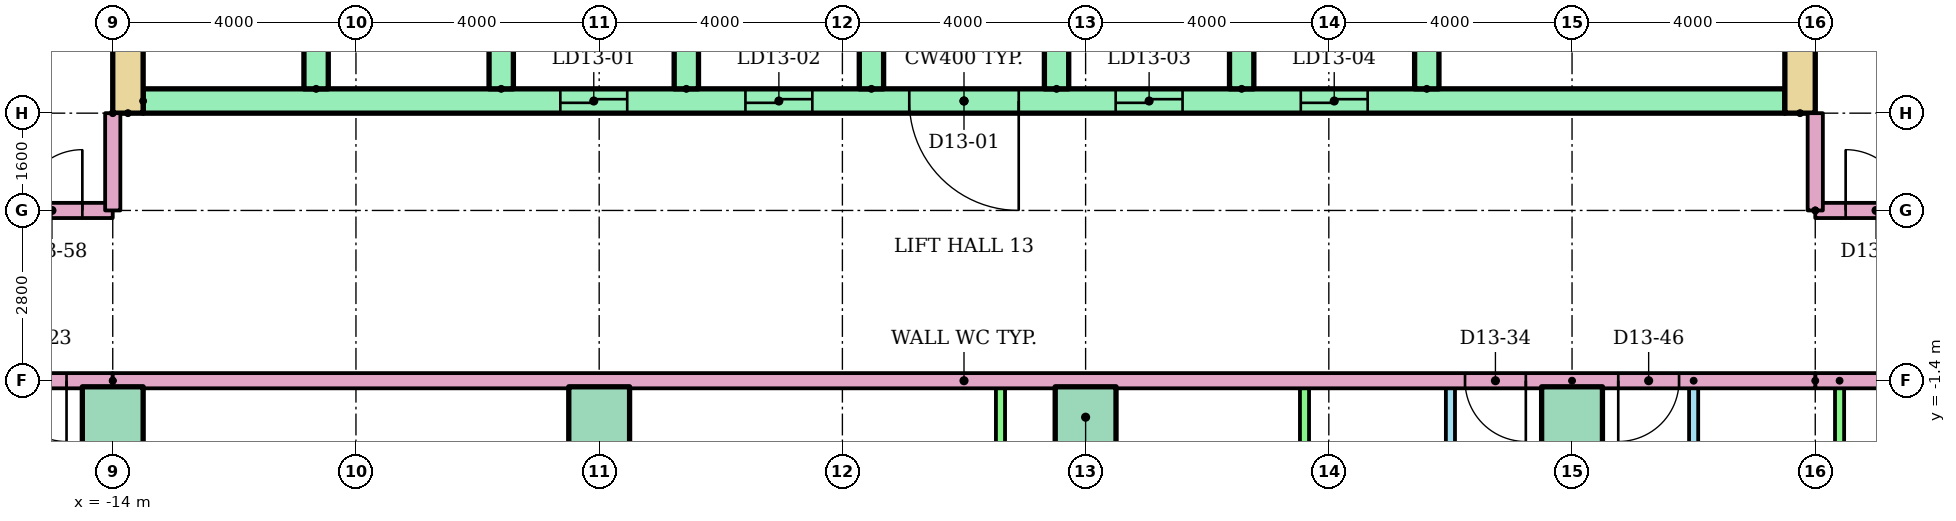
"""IFC4 building model, lengths in metres.
Left out: names, types, materials, properties, quantities, classifications, styles, units other than length and angle.
Written with IfcOpenShell. Run it as: python <this file> out.ifc"""

import sys

from ifc_helpers import new_model, si_unit, direction, frame, frame_2d, origin, origin_2d, place, context, subcontext, project, spatial, rectangle, extrude, element, fill, save


model = new_model("IFC4")
c1 = context("Model", 3, precision=1e-05, world=origin(), true_north=direction((0.0, 1.0)))
c2 = subcontext(c1, "Body", "Model", "MODEL_VIEW")
j1 = project(units=[si_unit("LENGTHUNIT", "METRE"), si_unit("PLANEANGLEUNIT", "RADIAN")], contexts=[c1])
p1 = place(None, origin())
s1 = spatial("IfcSite", under=j1, at=p1, CompositionType="ELEMENT")
p2 = place(p1, origin())
s2 = spatial("IfcBuilding", under=s1, at=p2, CompositionType="ELEMENT")
p3 = place(p2, frame((0.0, 0.0, 51.2)))
s3 = spatial("IfcBuildingStorey", under=s2, at=p3, CompositionType="ELEMENT", Elevation=51.2)
for number, where in (
    (1, (-14.0, -2.0, 0.0)),
    (2, (-6.0, -2.0, 0.0)),
    (3, (2.0, -2.0, 0.0)),
    (4, (10.0, -2.0, 0.0)),
):
    element("IfcColumn", number, at=place(p3, frame(where)), inside=s3, PredefinedType="COLUMN", context=c2, shape_type="SweptSolid", body=[
        extrude(rectangle(XDim=1.0, YDim=1.0, at=origin_2d()), origin(), (0.0, 0.0, 1.0), 3.2),
    ])
for number, where, z_axis, x_axis in (
    (5, (-13.75, 3.0, 0.0), (0.0, 0.0, 1.0), (0.0, 1.0, 0.0)),
    (6, (13.75, 3.0, 0.0), (0.0, 0.0, 1.0), (0.0, 1.0, 0.0)),
):
    element("IfcWall", number, at=place(p3, frame(where, z_axis=z_axis, x_axis=x_axis)), inside=s3, PredefinedType="SHEAR", context=c2, shape_type="SweptSolid", body=[
        extrude(rectangle(XDim=17.0, YDim=0.5, at=frame_2d((8.5, 0.0))), origin(), (0.0, 0.0, 1.0), 2.92),
    ])
p4 = place(p3, frame((-13.5, 3.2, 0.0)))
e7 = element("IfcWall", 7, at=p4, inside=s3, PredefinedType="SHEAR", context=c2, shape_type="SweptSolid", body=[
    extrude(rectangle(XDim=27.0, YDim=0.4, at=frame_2d((13.5, 0.0))), origin(), (0.0, 0.0, 1.0), 2.92),
])
p5 = place(p4, frame((6.861, 0.0, 0.0)))
e8 = element("IfcOpeningElement", 8, at=p5, cuts=e7, PredefinedType="OPENING", context=c2, shape_type="SweptSolid", body=[
    extrude(rectangle(XDim=1.1, YDim=2.1, at=frame_2d((0.55, 1.05))), frame((0.0, 0.21, 0.0), z_axis=(0.0, -1.0, 0.0), x_axis=(1.0, 0.0, 0.0)), (0.0, 0.0, 1.0), 0.42),
])
p6 = place(p4, frame((9.906, 0.0, 0.0)))
e9 = element("IfcOpeningElement", 9, at=p6, cuts=e7, PredefinedType="OPENING", context=c2, shape_type="SweptSolid", body=[
    extrude(rectangle(XDim=1.1, YDim=2.1, at=frame_2d((0.55, 1.05))), frame((0.0, 0.21, 0.0), z_axis=(0.0, -1.0, 0.0), x_axis=(1.0, 0.0, 0.0)), (0.0, 0.0, 1.0), 0.42),
])
p7 = place(p4, frame((15.994, 0.0, 0.0)))
e10 = element("IfcOpeningElement", 10, at=p7, cuts=e7, PredefinedType="OPENING", context=c2, shape_type="SweptSolid", body=[
    extrude(rectangle(XDim=1.1, YDim=2.1, at=frame_2d((0.55, 1.05))), frame((0.0, 0.21, 0.0), z_axis=(0.0, -1.0, 0.0), x_axis=(1.0, 0.0, 0.0)), (0.0, 0.0, 1.0), 0.42),
])
p8 = place(p4, frame((19.039, 0.0, 0.0)))
e11 = element("IfcOpeningElement", 11, at=p8, cuts=e7, PredefinedType="OPENING", context=c2, shape_type="SweptSolid", body=[
    extrude(rectangle(XDim=1.1, YDim=2.1, at=frame_2d((0.55, 1.05))), frame((0.0, 0.21, 0.0), z_axis=(0.0, -1.0, 0.0), x_axis=(1.0, 0.0, 0.0)), (0.0, 0.0, 1.0), 0.42),
])
p9 = place(p4, frame((12.6, 0.0, 0.0)))
e12 = element("IfcOpeningElement", 12, at=p9, cuts=e7, PredefinedType="OPENING", context=c2, shape_type="SweptSolid", body=[
    extrude(rectangle(XDim=1.8, YDim=2.1, at=frame_2d((0.9, 1.05))), frame((0.0, 0.21, 0.0), z_axis=(0.0, -1.0, 0.0), x_axis=(1.0, 0.0, 0.0)), (0.0, 0.0, 1.0), 0.42),
])
for number, where, z_axis, x_axis in (
    (13, (-10.656, 3.4, 0.0), (0.0, 0.0, 1.0), (0.0, 1.0, 0.0)),
    (14, (-7.611, 3.4, 0.0), (0.0, 0.0, 1.0), (0.0, 1.0, 0.0)),
    (15, (-4.567, 3.4, 0.0), (0.0, 0.0, 1.0), (0.0, 1.0, 0.0)),
    (16, (-1.522, 3.4, 0.0), (0.0, 0.0, 1.0), (0.0, 1.0, 0.0)),
    (17, (1.522, 3.4, 0.0), (0.0, 0.0, 1.0), (0.0, 1.0, 0.0)),
    (18, (4.567, 3.4, 0.0), (0.0, 0.0, 1.0), (0.0, 1.0, 0.0)),
    (19, (7.611, 3.4, 0.0), (0.0, 0.0, 1.0), (0.0, 1.0, 0.0)),
):
    element("IfcWall", number, at=place(p3, frame(where, z_axis=z_axis, x_axis=x_axis)), inside=s3, PredefinedType="SHEAR", context=c2, shape_type="SweptSolid", body=[
        extrude(rectangle(XDim=3.0, YDim=0.4, at=frame_2d((1.5, 0.0))), origin(), (0.0, 0.0, 1.0), 2.92),
    ])
p10 = place(p3, frame((8.0, -9.0, 0.0), z_axis=(0.0, 0.0, 1.0), x_axis=(0.0, 1.0, 0.0)))
e20 = element("IfcWall", 20, at=p10, inside=s3, PredefinedType="PARTITIONING", context=c2, shape_type="SweptSolid", body=[
    extrude(rectangle(XDim=7.6, YDim=0.15, at=frame_2d((3.8, 0.0))), origin(), (0.0, 0.0, 1.0), 2.4),
])
p11 = place(p10, frame((5.025, 0.0, 0.0)))
e21 = element("IfcOpeningElement", 21, at=p11, cuts=e20, PredefinedType="OPENING", context=c2, shape_type="SweptSolid", body=[
    extrude(rectangle(XDim=0.9, YDim=2.1, at=frame_2d((0.45, 1.05))), frame((0.0, 0.085, 0.0), z_axis=(0.0, -1.0, 0.0), x_axis=(1.0, 0.0, 0.0)), (0.0, 0.0, 1.0), 0.17),
])
p12 = place(p10, frame((1.275, 0.0, 0.0)))
e22 = element("IfcOpeningElement", 22, at=p12, cuts=e20, PredefinedType="OPENING", context=c2, shape_type="SweptSolid", body=[
    extrude(rectangle(XDim=0.8, YDim=2.1, at=frame_2d((0.4, 1.05))), frame((0.0, 0.085, 0.0), z_axis=(0.0, -1.0, 0.0), x_axis=(1.0, 0.0, 0.0)), (0.0, 0.0, 1.0), 0.17),
])
for number, where, z_axis, x_axis in (
    (23, (5.6, -9.0, 0.0), (0.0, 0.0, 1.0), (0.0, 1.0, 0.0)),
    (24, (0.6, -9.0, 0.0), (0.0, 0.0, 1.0), (0.0, 1.0, 0.0)),
    (25, (-5.9, -9.0, 0.0), (0.0, 0.0, 1.0), (0.0, 1.0, 0.0)),
):
    element("IfcWall", number, at=place(p3, frame(where, z_axis=z_axis, x_axis=x_axis)), inside=s3, PredefinedType="PARTITIONING", context=c2, shape_type="SweptSolid", body=[
        extrude(rectangle(XDim=7.6, YDim=0.15, at=frame_2d((3.8, 0.0))), origin(), (0.0, 0.0, 1.0), 2.4),
    ])
p13 = place(p3, frame((-14.0, -1.4, 0.0), z_axis=(0.0, 0.0, 1.0), x_axis=(0.0, -1.0, 0.0)))
e26 = element("IfcWall", 26, at=p13, inside=s3, PredefinedType="PARTITIONING", context=c2, shape_type="SweptSolid", body=[
    extrude(rectangle(XDim=14.71, YDim=0.25, at=frame_2d((7.355, 0.0))), origin(), (0.0, 0.0, 1.0), 2.4),
])
p14 = place(p3, frame((12.0, -1.4, 0.0), z_axis=(0.0, 0.0, 1.0), x_axis=(0.0, -1.0, 0.0)))
e27 = element("IfcWall", 27, at=p14, inside=s3, PredefinedType="PARTITIONING", context=c2, shape_type="SweptSolid", body=[
    extrude(rectangle(XDim=7.6, YDim=0.15, at=frame_2d((3.8, 0.0))), origin(), (0.0, 0.0, 1.0), 2.4),
])
p15 = place(p14, frame((1.675, 0.0, 0.0)))
e28 = element("IfcOpeningElement", 28, at=p15, cuts=e27, PredefinedType="OPENING", context=c2, shape_type="SweptSolid", body=[
    extrude(rectangle(XDim=0.9, YDim=2.1, at=frame_2d((0.45, 1.05))), frame((0.0, 0.085, 0.0), z_axis=(0.0, -1.0, 0.0), x_axis=(1.0, 0.0, 0.0)), (0.0, 0.0, 1.0), 0.17),
])
p16 = place(p14, frame((5.525, 0.0, 0.0)))
e29 = element("IfcOpeningElement", 29, at=p16, cuts=e27, PredefinedType="OPENING", context=c2, shape_type="SweptSolid", body=[
    extrude(rectangle(XDim=0.8, YDim=2.1, at=frame_2d((0.4, 1.05))), frame((0.0, 0.085, 0.0), z_axis=(0.0, -1.0, 0.0), x_axis=(1.0, 0.0, 0.0)), (0.0, 0.0, 1.0), 0.17),
])
p17 = place(p3, frame((14.4, -1.4, 0.0), z_axis=(0.0, 0.0, 1.0), x_axis=(0.0, -1.0, 0.0)))
e30 = element("IfcWall", 30, at=p17, inside=s3, PredefinedType="PARTITIONING", context=c2, shape_type="SweptSolid", body=[
    extrude(rectangle(XDim=7.6, YDim=0.15, at=frame_2d((3.8, 0.0))), origin(), (0.0, 0.0, 1.0), 2.4),
])
p18 = place(p3, frame((10.0, -1.4, 0.0), z_axis=(0.0, 0.0, 1.0), x_axis=(0.0, -1.0, 0.0)))
e31 = element("IfcWall", 31, at=p18, inside=s3, PredefinedType="PARTITIONING", context=c2, shape_type="SweptSolid", body=[
    extrude(rectangle(XDim=14.71, YDim=0.25, at=frame_2d((7.355, 0.0))), origin(), (0.0, 0.0, 1.0), 2.4),
])
p19 = place(p3, frame((-14.0, -1.4, 0.0), z_axis=(0.0, 0.0, 1.0), x_axis=(-1.0, 0.0, 0.0)))
e32 = element("IfcWall", 32, at=p19, inside=s3, PredefinedType="PARTITIONING", context=c2, shape_type="SweptSolid", body=[
    extrude(rectangle(XDim=15.0, YDim=0.25, at=frame_2d((7.5, 0.0))), origin(), (0.0, 0.0, 1.0), 2.4),
])
p20 = place(p19, frame((0.76, 0.0, 0.0)))
e33 = element("IfcOpeningElement", 33, at=p20, cuts=e32, PredefinedType="OPENING", context=c2, shape_type="SweptSolid", body=[
    extrude(rectangle(XDim=1.0, YDim=2.1, at=frame_2d((0.5, 1.05))), frame((0.0, 0.135, 0.0), z_axis=(0.0, -1.0, 0.0), x_axis=(1.0, 0.0, 0.0)), (0.0, 0.0, 1.0), 0.27),
])
p21 = place(p3, frame((29.0, -1.4, 0.0), z_axis=(0.0, 0.0, 1.0), x_axis=(-1.0, 0.0, 0.0)))
e34 = element("IfcWall", 34, at=p21, inside=s3, PredefinedType="PARTITIONING", context=c2, shape_type="SweptSolid", body=[
    extrude(rectangle(XDim=15.0, YDim=0.25, at=frame_2d((7.5, 0.0))), origin(), (0.0, 0.0, 1.0), 2.4),
])
p22 = place(p3, frame((-29.0, 1.4, 0.0)))
e35 = element("IfcWall", 35, at=p22, inside=s3, PredefinedType="PARTITIONING", context=c2, shape_type="SweptSolid", body=[
    extrude(rectangle(XDim=15.0, YDim=0.25, at=frame_2d((7.5, 0.0))), origin(), (0.0, 0.0, 1.0), 2.4),
])
p23 = place(p22, frame((5.24, 0.0, 0.0)))
e36 = element("IfcOpeningElement", 36, at=p23, cuts=e35, PredefinedType="OPENING", context=c2, shape_type="SweptSolid", body=[
    extrude(rectangle(XDim=1.0, YDim=2.1, at=frame_2d((0.5, 1.05))), frame((0.0, 0.135, 0.0), z_axis=(0.0, -1.0, 0.0), x_axis=(1.0, 0.0, 0.0)), (0.0, 0.0, 1.0), 0.27),
])
p24 = place(p22, frame((13.5, 0.0, 0.0)))
e37 = element("IfcOpeningElement", 37, at=p24, cuts=e35, PredefinedType="OPENING", context=c2, shape_type="SweptSolid", body=[
    extrude(rectangle(XDim=1.0, YDim=2.1, at=frame_2d((0.5, 1.05))), frame((0.0, 0.135, 0.0), z_axis=(0.0, -1.0, 0.0), x_axis=(1.0, 0.0, 0.0)), (0.0, 0.0, 1.0), 0.27),
])
p25 = place(p3, frame((14.0, 1.4, 0.0)))
e38 = element("IfcWall", 38, at=p25, inside=s3, PredefinedType="PARTITIONING", context=c2, shape_type="SweptSolid", body=[
    extrude(rectangle(XDim=15.0, YDim=0.25, at=frame_2d((7.5, 0.0))), origin(), (0.0, 0.0, 1.0), 2.4),
])
p26 = place(p25, frame((0.5, 0.0, 0.0)))
e39 = element("IfcOpeningElement", 39, at=p26, cuts=e38, PredefinedType="OPENING", context=c2, shape_type="SweptSolid", body=[
    extrude(rectangle(XDim=1.0, YDim=2.1, at=frame_2d((0.5, 1.05))), frame((0.0, 0.135, 0.0), z_axis=(0.0, -1.0, 0.0), x_axis=(1.0, 0.0, 0.0)), (0.0, 0.0, 1.0), 0.27),
])
p27 = place(p3, frame((14.0, -1.4, 0.0), z_axis=(0.0, 0.0, 1.0), x_axis=(-1.0, 0.0, 0.0)))
e40 = element("IfcWall", 40, at=p27, inside=s3, PredefinedType="PARTITIONING", context=c2, shape_type="SweptSolid", body=[
    extrude(rectangle(XDim=28.0, YDim=0.25, at=frame_2d((14.0, 0.0))), origin(), (0.0, 0.0, 1.0), 2.4),
])
p28 = place(p27, frame((4.76, 0.0, 0.0)))
e41 = element("IfcOpeningElement", 41, at=p28, cuts=e40, PredefinedType="OPENING", context=c2, shape_type="SweptSolid", body=[
    extrude(rectangle(XDim=1.0, YDim=2.1, at=frame_2d((0.5, 1.05))), frame((0.0, 0.135, 0.0), z_axis=(0.0, -1.0, 0.0), x_axis=(1.0, 0.0, 0.0)), (0.0, 0.0, 1.0), 0.27),
])
p29 = place(p27, frame((2.24, 0.0, 0.0)))
e42 = element("IfcOpeningElement", 42, at=p29, cuts=e40, PredefinedType="OPENING", context=c2, shape_type="SweptSolid", body=[
    extrude(rectangle(XDim=1.0, YDim=2.1, at=frame_2d((0.5, 1.05))), frame((0.0, 0.135, 0.0), z_axis=(0.0, -1.0, 0.0), x_axis=(1.0, 0.0, 0.0)), (0.0, 0.0, 1.0), 0.27),
])
for number, where, z_axis, x_axis in (
    (43, (-14.0, 3.0, 0.0), (0.0, 0.0, 1.0), (0.0, -1.0, 0.0)),
    (44, (14.0, 1.4, 0.0), (0.0, 0.0, 1.0), (0.0, 1.0, 0.0)),
):
    element("IfcWall", number, at=place(p3, frame(where, z_axis=z_axis, x_axis=x_axis)), inside=s3, PredefinedType="PARTITIONING", context=c2, shape_type="SweptSolid", body=[
        extrude(rectangle(XDim=1.6, YDim=0.25, at=frame_2d((0.8, 0.0))), origin(), (0.0, 0.0, 1.0), 2.4),
    ])
p30 = place(p5, origin())
e45 = element("IfcDoor", 45, at=p30, inside=s3, OperationType="SLIDING_TO_LEFT", PredefinedType="DOOR", context=c2, shape_type="SweptSolid", body=[
    extrude(rectangle(XDim=1.1, YDim=2.1, at=frame_2d((0.55, 1.05))), frame((0.0, 0.025, 0.0), z_axis=(0.0, -1.0, 0.0), x_axis=(1.0, 0.0, 0.0)), (0.0, 0.0, 1.0), 0.05),
])
fill(e8, e45)
p31 = place(p6, origin())
e46 = element("IfcDoor", 46, at=p31, inside=s3, OperationType="SLIDING_TO_LEFT", PredefinedType="DOOR", context=c2, shape_type="SweptSolid", body=[
    extrude(rectangle(XDim=1.1, YDim=2.1, at=frame_2d((0.55, 1.05))), frame((0.0, 0.025, 0.0), z_axis=(0.0, -1.0, 0.0), x_axis=(1.0, 0.0, 0.0)), (0.0, 0.0, 1.0), 0.05),
])
fill(e9, e46)
p32 = place(p7, origin())
e47 = element("IfcDoor", 47, at=p32, inside=s3, OperationType="SLIDING_TO_LEFT", PredefinedType="DOOR", context=c2, shape_type="SweptSolid", body=[
    extrude(rectangle(XDim=1.1, YDim=2.1, at=frame_2d((0.55, 1.05))), frame((0.0, 0.025, 0.0), z_axis=(0.0, -1.0, 0.0), x_axis=(1.0, 0.0, 0.0)), (0.0, 0.0, 1.0), 0.05),
])
fill(e10, e47)
p33 = place(p8, origin())
e48 = element("IfcDoor", 48, at=p33, inside=s3, OperationType="SLIDING_TO_LEFT", PredefinedType="DOOR", context=c2, shape_type="SweptSolid", body=[
    extrude(rectangle(XDim=1.1, YDim=2.1, at=frame_2d((0.55, 1.05))), frame((0.0, 0.025, 0.0), z_axis=(0.0, -1.0, 0.0), x_axis=(1.0, 0.0, 0.0)), (0.0, 0.0, 1.0), 0.05),
])
fill(e11, e48)
p34 = place(p9, frame((1.8, 0.0, 0.0), z_axis=(0.0, 0.0, 1.0), x_axis=(-1.0, 0.0, 0.0)))
e49 = element("IfcDoor", 49, at=p34, inside=s3, OperationType="DOUBLE_DOOR_SINGLE_SWING", PredefinedType="DOOR", context=c2, shape_type="SweptSolid", body=[
    extrude(rectangle(XDim=1.8, YDim=2.1, at=frame_2d((0.9, 1.05))), frame((0.0, 0.025, 0.0), z_axis=(0.0, -1.0, 0.0), x_axis=(1.0, 0.0, 0.0)), (0.0, 0.0, 1.0), 0.05),
])
fill(e12, e49)
p35 = place(p20, origin())
e50 = element("IfcDoor", 50, at=p35, inside=s3, OperationType="SINGLE_SWING_LEFT", PredefinedType="DOOR", context=c2, shape_type="SweptSolid", body=[
    extrude(rectangle(XDim=1.0, YDim=2.1, at=frame_2d((0.5, 1.05))), frame((0.0, 0.025, 0.0), z_axis=(0.0, -1.0, 0.0), x_axis=(1.0, 0.0, 0.0)), (0.0, 0.0, 1.0), 0.05),
])
fill(e33, e50)
p36 = place(p28, origin())
e51 = element("IfcDoor", 51, at=p36, inside=s3, OperationType="SINGLE_SWING_LEFT", PredefinedType="DOOR", context=c2, shape_type="SweptSolid", body=[
    extrude(rectangle(XDim=1.0, YDim=2.1, at=frame_2d((0.5, 1.05))), frame((0.0, 0.025, 0.0), z_axis=(0.0, -1.0, 0.0), x_axis=(1.0, 0.0, 0.0)), (0.0, 0.0, 1.0), 0.05),
])
fill(e41, e51)
p37 = place(p29, origin())
e52 = element("IfcDoor", 52, at=p37, inside=s3, OperationType="SINGLE_SWING_RIGHT", PredefinedType="DOOR", context=c2, shape_type="SweptSolid", body=[
    extrude(rectangle(XDim=1.0, YDim=2.1, at=frame_2d((0.5, 1.05))), frame((0.0, 0.025, 0.0), z_axis=(0.0, -1.0, 0.0), x_axis=(1.0, 0.0, 0.0)), (0.0, 0.0, 1.0), 0.05),
])
fill(e42, e52)
p38 = place(p24, origin())
e53 = element("IfcDoor", 53, at=p38, inside=s3, OperationType="SINGLE_SWING_RIGHT", PredefinedType="DOOR", context=c2, shape_type="SweptSolid", body=[
    extrude(rectangle(XDim=1.0, YDim=2.1, at=frame_2d((0.5, 1.05))), frame((0.0, 0.025, 0.0), z_axis=(0.0, -1.0, 0.0), x_axis=(1.0, 0.0, 0.0)), (0.0, 0.0, 1.0), 0.05),
])
fill(e37, e53)
p39 = place(p26, origin())
e54 = element("IfcDoor", 54, at=p39, inside=s3, OperationType="SINGLE_SWING_LEFT", PredefinedType="DOOR", context=c2, shape_type="SweptSolid", body=[
    extrude(rectangle(XDim=1.0, YDim=2.1, at=frame_2d((0.5, 1.05))), frame((0.0, 0.025, 0.0), z_axis=(0.0, -1.0, 0.0), x_axis=(1.0, 0.0, 0.0)), (0.0, 0.0, 1.0), 0.05),
])
fill(e39, e54)
save(model, sys.argv[1])
